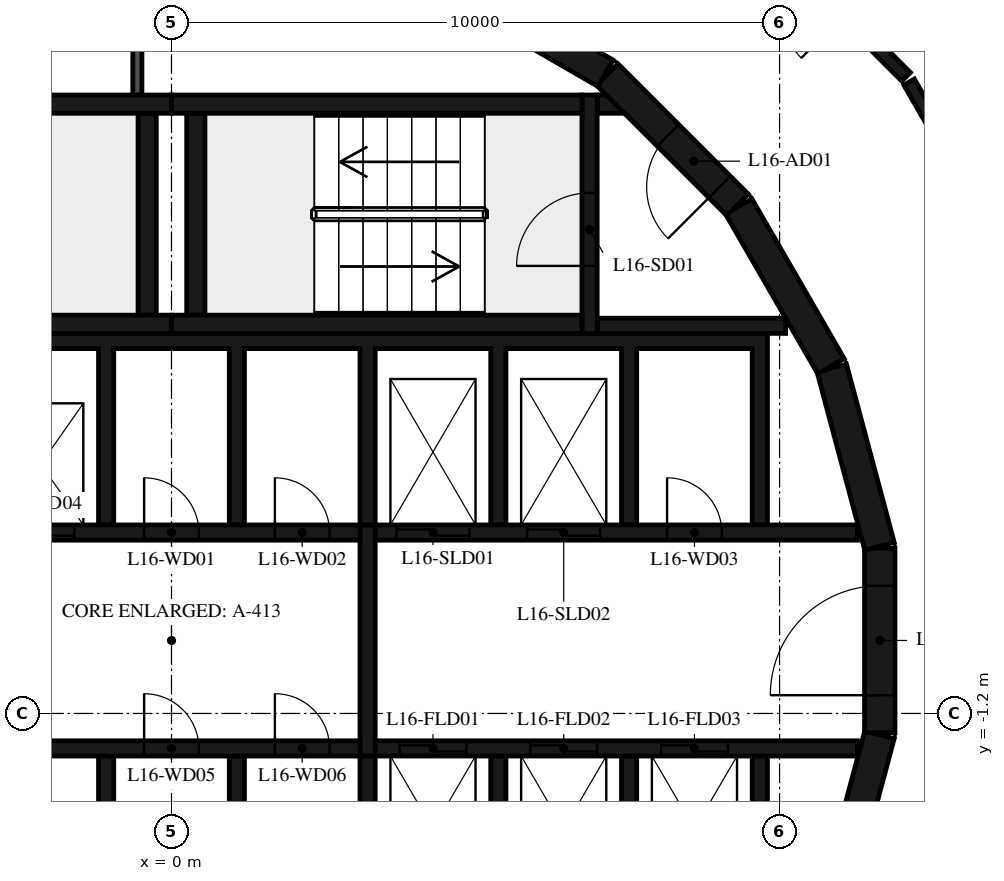
"""IFC4 building model, lengths in metres.
Left out: names, types, materials, properties, quantities, classifications, styles, units other than length and angle.
Written with IfcOpenShell. Run it as: python <this file> out.ifc"""

import sys

from ifc_helpers import new_model, si_unit, direction, frame, frame_2d, origin, place, context, subcontext, project, spatial, polyline, rectangle, outline, extrude, element, fill, save


model = new_model("IFC4")
c1 = context("Model", 3, precision=1e-05, world=origin(), true_north=direction((0.0, 1.0)))
c2 = subcontext(c1, "Body", "Model", "MODEL_VIEW")
j1 = project(units=[si_unit("LENGTHUNIT", "METRE"), si_unit("PLANEANGLEUNIT", "RADIAN")], contexts=[c1])
p1 = place(None, origin())
s1 = spatial("IfcSite", under=j1, at=p1, CompositionType="ELEMENT")
p2 = place(p1, origin())
s2 = spatial("IfcBuilding", under=s1, at=p2, CompositionType="ELEMENT")
p3 = place(p2, frame((0.0, 0.0, 69.9)))
s3 = spatial("IfcBuildingStorey", under=s2, at=p3, CompositionType="ELEMENT", Elevation=69.9)
p4 = place(p3, frame((10.858, -4.479, 0.0), z_axis=(0.0, 0.0, 1.0), x_axis=(0.258734743916, 0.965948410781, 0.0)))
e1 = element("IfcWall", 1, at=p4, inside=s3, PredefinedType="SHEAR", context=c2, shape_type="SweptSolid", body=[
    extrude(rectangle(XDim=3.033, YDim=0.5, at=frame_2d((1.516, 0.0))), origin(), (0.0, 0.0, 1.0), 6.35),
])
p5 = place(p3, frame((11.647, -1.516, 0.0), z_axis=(0.0, 0.0, 1.0), x_axis=(0.0, 1.0, 0.0)))
e2 = element("IfcWall", 2, at=p5, inside=s3, PredefinedType="SHEAR", context=c2, shape_type="SweptSolid", body=[
    extrude(rectangle(XDim=3.033, YDim=0.5, at=frame_2d((1.516, 0.0))), origin(), (0.0, 0.0, 1.0), 6.35),
])
p6 = place(p5, frame((0.616, 0.0, 0.0)))
e3 = element("IfcOpeningElement", 3, at=p6, cuts=e2, PredefinedType="OPENING", context=c2, shape_type="SweptSolid", body=[
    extrude(rectangle(XDim=1.8, YDim=2.1, at=frame_2d((0.9, 1.05))), frame((0.0, 0.26, 0.0), z_axis=(0.0, -1.0, 0.0), x_axis=(1.0, 0.0, 0.0)), (0.0, 0.0, 1.0), 0.52),
])
for number, where, z_axis, x_axis in (
    (4, (11.643, 1.55, 0.0), (0.0, 0.0, 1.0), (-0.259, 0.966, 0.0)),
    (5, (10.845, 4.51, 0.0), (0.0, 0.0, 1.0), (-0.5, 0.866, 0.0)),
):
    element("IfcWall", number, at=place(p3, frame(where, z_axis=z_axis, x_axis=x_axis)), inside=s3, PredefinedType="SHEAR", context=c2, shape_type="SweptSolid", body=[
        extrude(rectangle(XDim=3.033, YDim=0.5, at=frame_2d((1.516, 0.0))), origin(), (0.0, 0.0, 1.0), 6.35),
    ])
p7 = place(p3, frame((9.308, 7.164, 0.0), z_axis=(0.0, 0.0, 1.0), x_axis=(-0.707106781187, 0.707106781187, 0.0)))
e6 = element("IfcWall", 6, at=p7, inside=s3, PredefinedType="SHEAR", context=c2, shape_type="SweptSolid", body=[
    extrude(rectangle(XDim=3.032, YDim=0.5, at=frame_2d((1.516, 0.0))), origin(), (0.0, 0.0, 1.0), 6.35),
])
p8 = place(p7, frame((0.416, 0.0, 0.0)))
e7 = element("IfcOpeningElement", 7, at=p8, cuts=e6, PredefinedType="OPENING", context=c2, shape_type="SweptSolid", body=[
    extrude(rectangle(XDim=1.2, YDim=2.1, at=frame_2d((0.6, 1.05))), frame((0.0, 0.26, 0.0), z_axis=(0.0, -1.0, 0.0), x_axis=(1.0, 0.0, 0.0)), (0.0, 0.0, 1.0), 0.52),
])
p9 = place(p3, frame((7.137, 9.329, 0.0), z_axis=(0.0, 0.0, 1.0), x_axis=(-0.865975092491, 0.500087131594, 0.0)))
e8 = element("IfcWall", 8, at=p9, inside=s3, PredefinedType="SHEAR", context=c2, shape_type="SweptSolid", body=[
    extrude(rectangle(XDim=3.033, YDim=0.5, at=frame_2d((1.516, 0.0))), origin(), (0.0, 0.0, 1.0), 6.35),
])
for number, where, z_axis, x_axis in (
    (9, (0.0, 5.2, 0.0), (0.0, 0.0, 1.0), (1.0, 0.0, 0.0)),
    (10, (0.0, 8.82, 0.0), (0.0, 0.0, 1.0), (1.0, 0.0, 0.0)),
):
    element("IfcWall", number, at=place(p3, frame(where, z_axis=z_axis, x_axis=x_axis)), inside=s3, PredefinedType="SHEAR", context=c2, shape_type="SweptSolid", body=[
        extrude(rectangle(XDim=6.75, YDim=0.3, at=frame_2d((3.375, 0.0))), origin(), (0.0, 0.0, 1.0), 6.35),
    ])
p10 = place(p3, frame((0.4, 5.35, 0.0), z_axis=(0.0, 0.0, 1.0), x_axis=(0.0, 1.0, 0.0)))
e11 = element("IfcWall", 11, at=p10, inside=s3, PredefinedType="SHEAR", context=c2, shape_type="SweptSolid", body=[
    extrude(rectangle(XDim=3.32, YDim=0.3, at=frame_2d((1.66, 0.0))), origin(), (0.0, 0.0, 1.0), 6.35),
])
p11 = place(p3, frame((6.875, 5.05, 0.0), z_axis=(0.0, 0.0, 1.0), x_axis=(0.0, 1.0, 0.0)))
e12 = element("IfcWall", 12, at=p11, inside=s3, PredefinedType="SHEAR", context=c2, shape_type="SweptSolid", body=[
    extrude(rectangle(XDim=3.92, YDim=0.25, at=frame_2d((1.96, 0.0))), origin(), (0.0, 0.0, 1.0), 6.35),
])
p12 = place(p11, frame((1.11, 0.0, 0.0)))
e13 = element("IfcOpeningElement", 13, at=p12, cuts=e12, PredefinedType="OPENING", context=c2, shape_type="SweptSolid", body=[
    extrude(rectangle(XDim=1.2, YDim=2.1, at=frame_2d((0.6, 1.05))), frame((0.0, 0.135, 0.0), z_axis=(0.0, -1.0, 0.0), x_axis=(1.0, 0.0, 0.0)), (0.0, 0.0, 1.0), 0.27),
])
p13 = place(p3, frame((7.0, 5.175, 0.0), z_axis=(0.0, 0.0, 1.0), x_axis=(1.0, 0.0, 0.0)))
e14 = element("IfcWall", 14, at=p13, inside=s3, PredefinedType="SHEAR", context=c2, shape_type="SweptSolid", body=[
    extrude(rectangle(XDim=3.1, YDim=0.25, at=frame_2d((1.55, 0.0))), origin(), (0.0, 0.0, 1.0), 6.35),
])
p14 = place(p3, origin())
e15 = element("IfcWall", 15, at=p14, inside=s3, PredefinedType="SHEAR", context=c2, shape_type="SweptSolid", body=[
    extrude(outline(polyline([(7.448, 8.67), (7.0, 8.67), (7.0, 8.97), (7.148, 8.97), (7.448, 8.67)])), origin(), (0.0, 0.0, 1.0), 6.35),
])
for number, where, z_axis, x_axis in (
    (16, (-6.75, 5.2, 0.0), (0.0, 0.0, 1.0), (1.0, 0.0, 0.0)),
    (17, (-6.75, 8.82, 0.0), (0.0, 0.0, 1.0), (1.0, 0.0, 0.0)),
):
    element("IfcWall", number, at=place(p3, frame(where, z_axis=z_axis, x_axis=x_axis)), inside=s3, PredefinedType="SHEAR", context=c2, shape_type="SweptSolid", body=[
        extrude(rectangle(XDim=6.75, YDim=0.3, at=frame_2d((3.375, 0.0))), origin(), (0.0, 0.0, 1.0), 6.35),
    ])
p15 = place(p3, frame((-0.4, 5.35, 0.0), z_axis=(0.0, 0.0, 1.0), x_axis=(0.0, 1.0, 0.0)))
e18 = element("IfcWall", 18, at=p15, inside=s3, PredefinedType="SHEAR", context=c2, shape_type="SweptSolid", body=[
    extrude(rectangle(XDim=3.32, YDim=0.3, at=frame_2d((1.66, 0.0))), origin(), (0.0, 0.0, 1.0), 6.35),
])
p16 = place(p3, origin())
e19 = element("IfcWall", 19, at=p16, inside=s3, PredefinedType="SHEAR", context=c2, shape_type="SweptSolid", body=[
    extrude(outline(polyline([(-9.55, 4.8), (-7.65, 4.8), (-7.65, 1.9), (-7.4, 1.9), (-7.4, 4.8), (-5.5, 4.8), (-5.5, 1.9), (-5.25, 1.9), (-5.25, 4.8), (-3.35, 4.8), (-3.35, 1.9), (-3.1, 1.9), (-3.1, 4.8), (-1.2, 4.8), (-1.2, 1.9), (-0.95, 1.9), (-0.95, 4.8), (0.95, 4.8), (0.95, 1.9), (1.2, 1.9), (1.2, 4.8), (3.1, 4.8), (3.1, 1.9), (3.35, 1.9), (3.35, 4.8), (5.25, 4.8), (5.25, 1.9), (5.5, 1.9), (5.5, 4.8), (7.4, 4.8), (7.4, 1.9), (7.65, 1.9), (7.65, 4.8), (9.55, 4.8), (9.55, 1.9), (9.8, 1.9), (9.8, 4.8), (9.8, 5.05), (-9.8, 5.05), (-9.8, 4.8), (-9.8, 1.9), (-9.55, 1.9), (-9.55, 4.8)])), origin(), (0.0, 0.0, 1.0), 6.35),
])
p17 = place(p3, origin())
e20 = element("IfcWall", 20, at=p17, inside=s3, PredefinedType="SHEAR", context=c2, shape_type="SweptSolid", body=[
    extrude(outline(polyline([(9.8, -5.05), (9.8, -4.8), (9.8, -1.9), (9.55, -1.9), (9.55, -4.8), (7.65, -4.8), (7.65, -1.9), (7.4, -1.9), (7.4, -4.8), (5.5, -4.8), (5.5, -1.9), (5.25, -1.9), (5.25, -4.8), (3.35, -4.8), (3.35, -1.9), (3.1, -1.9), (3.1, -4.8), (1.2, -4.8), (1.2, -1.9), (0.95, -1.9), (0.95, -4.8), (-0.95, -4.8), (-0.95, -1.9), (-1.2, -1.9), (-1.2, -4.8), (-5.25, -4.8), (-5.25, -1.9), (-5.5, -1.9), (-5.5, -4.8), (-7.4, -4.8), (-7.4, -1.9), (-7.65, -1.9), (-7.65, -4.8), (-9.55, -4.8), (-9.55, -1.9), (-9.8, -1.9), (-9.8, -4.8), (-9.8, -5.05), (9.8, -5.05)])), origin(), (0.0, 0.0, 1.0), 6.35),
])
p18 = place(p3, frame((-11.28, 1.775, 0.0), z_axis=(0.0, 0.0, 1.0), x_axis=(1.0, 0.0, 0.0)))
e21 = element("IfcWall", 21, at=p18, inside=s3, PredefinedType="SHEAR", context=c2, shape_type="SweptSolid", body=[
    extrude(rectangle(XDim=14.38, YDim=0.25, at=frame_2d((7.19, 0.0))), origin(), (0.0, 0.0, 1.0), 6.35),
])
p19 = place(p18, frame((2.13, 0.0, 0.0)))
e22 = element("IfcOpeningElement", 22, at=p19, cuts=e21, PredefinedType="OPENING", context=c2, shape_type="SweptSolid", body=[
    extrude(rectangle(XDim=1.1, YDim=2.1, at=frame_2d((0.55, 1.05))), frame((0.0, 0.135, 0.0), z_axis=(0.0, -1.0, 0.0), x_axis=(1.0, 0.0, 0.0)), (0.0, 0.0, 1.0), 0.27),
])
p20 = place(p18, frame((4.28, 0.0, 0.0)))
e23 = element("IfcOpeningElement", 23, at=p20, cuts=e21, PredefinedType="OPENING", context=c2, shape_type="SweptSolid", body=[
    extrude(rectangle(XDim=1.1, YDim=2.1, at=frame_2d((0.55, 1.05))), frame((0.0, 0.135, 0.0), z_axis=(0.0, -1.0, 0.0), x_axis=(1.0, 0.0, 0.0)), (0.0, 0.0, 1.0), 0.27),
])
p21 = place(p18, frame((6.43, 0.0, 0.0)))
e24 = element("IfcOpeningElement", 24, at=p21, cuts=e21, PredefinedType="OPENING", context=c2, shape_type="SweptSolid", body=[
    extrude(rectangle(XDim=1.1, YDim=2.1, at=frame_2d((0.55, 1.05))), frame((0.0, 0.135, 0.0), z_axis=(0.0, -1.0, 0.0), x_axis=(1.0, 0.0, 0.0)), (0.0, 0.0, 1.0), 0.27),
])
p22 = place(p18, frame((8.58, 0.0, 0.0)))
e25 = element("IfcOpeningElement", 25, at=p22, cuts=e21, PredefinedType="OPENING", context=c2, shape_type="SweptSolid", body=[
    extrude(rectangle(XDim=1.1, YDim=2.1, at=frame_2d((0.55, 1.05))), frame((0.0, 0.135, 0.0), z_axis=(0.0, -1.0, 0.0), x_axis=(1.0, 0.0, 0.0)), (0.0, 0.0, 1.0), 0.27),
])
p23 = place(p18, frame((10.83, 0.0, 0.0)))
e26 = element("IfcOpeningElement", 26, at=p23, cuts=e21, PredefinedType="OPENING", context=c2, shape_type="SweptSolid", body=[
    extrude(rectangle(XDim=0.9, YDim=2.1, at=frame_2d((0.45, 1.05))), frame((0.0, 0.135, 0.0), z_axis=(0.0, -1.0, 0.0), x_axis=(1.0, 0.0, 0.0)), (0.0, 0.0, 1.0), 0.27),
])
p24 = place(p18, frame((12.98, 0.0, 0.0)))
e27 = element("IfcOpeningElement", 27, at=p24, cuts=e21, PredefinedType="OPENING", context=c2, shape_type="SweptSolid", body=[
    extrude(rectangle(XDim=0.9, YDim=2.1, at=frame_2d((0.45, 1.05))), frame((0.0, 0.135, 0.0), z_axis=(0.0, -1.0, 0.0), x_axis=(1.0, 0.0, 0.0)), (0.0, 0.0, 1.0), 0.27),
])
p25 = place(p3, frame((3.35, 1.775, 0.0), z_axis=(0.0, 0.0, 1.0), x_axis=(1.0, 0.0, 0.0)))
e28 = element("IfcWall", 28, at=p25, inside=s3, PredefinedType="SHEAR", context=c2, shape_type="SweptSolid", body=[
    extrude(rectangle(XDim=7.93, YDim=0.25, at=frame_2d((3.965, 0.0))), origin(), (0.0, 0.0, 1.0), 6.35),
])
p26 = place(p25, frame((0.35, 0.0, 0.0)))
e29 = element("IfcOpeningElement", 29, at=p26, cuts=e28, PredefinedType="OPENING", context=c2, shape_type="SweptSolid", body=[
    extrude(rectangle(XDim=1.2, YDim=2.4, at=frame_2d((0.6, 1.2))), frame((0.0, 0.135, 0.0), z_axis=(0.0, -1.0, 0.0), x_axis=(1.0, 0.0, 0.0)), (0.0, 0.0, 1.0), 0.27),
])
p27 = place(p25, frame((2.5, 0.0, 0.0)))
e30 = element("IfcOpeningElement", 30, at=p27, cuts=e28, PredefinedType="OPENING", context=c2, shape_type="SweptSolid", body=[
    extrude(rectangle(XDim=1.2, YDim=2.4, at=frame_2d((0.6, 1.2))), frame((0.0, 0.135, 0.0), z_axis=(0.0, -1.0, 0.0), x_axis=(1.0, 0.0, 0.0)), (0.0, 0.0, 1.0), 0.27),
])
p28 = place(p25, frame((4.8, 0.0, 0.0)))
e31 = element("IfcOpeningElement", 31, at=p28, cuts=e28, PredefinedType="OPENING", context=c2, shape_type="SweptSolid", body=[
    extrude(rectangle(XDim=0.9, YDim=2.1, at=frame_2d((0.45, 1.05))), frame((0.0, 0.135, 0.0), z_axis=(0.0, -1.0, 0.0), x_axis=(1.0, 0.0, 0.0)), (0.0, 0.0, 1.0), 0.27),
])
p29 = place(p3, frame((-11.28, -1.775, 0.0), z_axis=(0.0, 0.0, 1.0), x_axis=(1.0, 0.0, 0.0)))
e32 = element("IfcWall", 32, at=p29, inside=s3, PredefinedType="SHEAR", context=c2, shape_type="SweptSolid", body=[
    extrude(rectangle(XDim=14.38, YDim=0.25, at=frame_2d((7.19, 0.0))), origin(), (0.0, 0.0, 1.0), 6.35),
])
p30 = place(p29, frame((7.605, 0.0, 0.0)))
e33 = element("IfcOpeningElement", 33, at=p30, cuts=e32, PredefinedType="OPENING", context=c2, shape_type="SweptSolid", body=[
    extrude(rectangle(XDim=0.9, YDim=2.1, at=frame_2d((0.45, 1.05))), frame((0.0, 0.135, 0.0), z_axis=(0.0, -1.0, 0.0), x_axis=(1.0, 0.0, 0.0)), (0.0, 0.0, 1.0), 0.27),
])
p31 = place(p29, frame((10.83, 0.0, 0.0)))
e34 = element("IfcOpeningElement", 34, at=p31, cuts=e32, PredefinedType="OPENING", context=c2, shape_type="SweptSolid", body=[
    extrude(rectangle(XDim=0.9, YDim=2.1, at=frame_2d((0.45, 1.05))), frame((0.0, 0.135, 0.0), z_axis=(0.0, -1.0, 0.0), x_axis=(1.0, 0.0, 0.0)), (0.0, 0.0, 1.0), 0.27),
])
p32 = place(p29, frame((12.98, 0.0, 0.0)))
e35 = element("IfcOpeningElement", 35, at=p32, cuts=e32, PredefinedType="OPENING", context=c2, shape_type="SweptSolid", body=[
    extrude(rectangle(XDim=0.9, YDim=2.1, at=frame_2d((0.45, 1.05))), frame((0.0, 0.135, 0.0), z_axis=(0.0, -1.0, 0.0), x_axis=(1.0, 0.0, 0.0)), (0.0, 0.0, 1.0), 0.27),
])
p33 = place(p3, frame((3.35, -1.775, 0.0), z_axis=(0.0, 0.0, 1.0), x_axis=(1.0, 0.0, 0.0)))
e36 = element("IfcWall", 36, at=p33, inside=s3, PredefinedType="SHEAR", context=c2, shape_type="SweptSolid", body=[
    extrude(rectangle(XDim=7.93, YDim=0.25, at=frame_2d((3.965, 0.0))), origin(), (0.0, 0.0, 1.0), 6.35),
])
p34 = place(p33, frame((0.4, 0.0, 0.0)))
e37 = element("IfcOpeningElement", 37, at=p34, cuts=e36, PredefinedType="OPENING", context=c2, shape_type="SweptSolid", body=[
    extrude(rectangle(XDim=1.1, YDim=2.4, at=frame_2d((0.55, 1.2))), frame((0.0, 0.135, 0.0), z_axis=(0.0, -1.0, 0.0), x_axis=(1.0, 0.0, 0.0)), (0.0, 0.0, 1.0), 0.27),
])
p35 = place(p33, frame((2.55, 0.0, 0.0)))
e38 = element("IfcOpeningElement", 38, at=p35, cuts=e36, PredefinedType="OPENING", context=c2, shape_type="SweptSolid", body=[
    extrude(rectangle(XDim=1.1, YDim=2.4, at=frame_2d((0.55, 1.2))), frame((0.0, 0.135, 0.0), z_axis=(0.0, -1.0, 0.0), x_axis=(1.0, 0.0, 0.0)), (0.0, 0.0, 1.0), 0.27),
])
p36 = place(p33, frame((4.7, 0.0, 0.0)))
e39 = element("IfcOpeningElement", 39, at=p36, cuts=e36, PredefinedType="OPENING", context=c2, shape_type="SweptSolid", body=[
    extrude(rectangle(XDim=1.1, YDim=2.4, at=frame_2d((0.55, 1.2))), frame((0.0, 0.135, 0.0), z_axis=(0.0, -1.0, 0.0), x_axis=(1.0, 0.0, 0.0)), (0.0, 0.0, 1.0), 0.27),
])
p37 = place(p3, frame((3.225, -1.9, 0.0), z_axis=(0.0, 0.0, 1.0), x_axis=(0.0, 1.0, 0.0)))
e40 = element("IfcWall", 40, at=p37, inside=s3, PredefinedType="SHEAR", context=c2, shape_type="SweptSolid", body=[
    extrude(rectangle(XDim=3.8, YDim=0.25, at=frame_2d((1.9, 0.0))), origin(), (0.0, 0.0, 1.0), 6.35),
])
p38 = place(p3, frame((-0.562, 8.97, 0.0), z_axis=(0.0, 0.0, 1.0), x_axis=(0.0, 1.0, 0.0)))
e41 = element("IfcWall", 41, at=p38, inside=s3, PredefinedType="PARTITIONING", context=c2, shape_type="SweptSolid", body=[
    extrude(rectangle(XDim=2.427, YDim=0.15, at=frame_2d((1.214, 0.0))), origin(), (0.0, 0.0, 1.0), 6.35),
])
p39 = place(p38, frame((0.764, 0.0, 0.0)))
e42 = element("IfcOpeningElement", 42, at=p39, cuts=e41, PredefinedType="OPENING", context=c2, shape_type="SweptSolid", body=[
    extrude(rectangle(XDim=0.9, YDim=2.1, at=frame_2d((0.45, 1.05))), frame((0.0, 0.085, 0.0), z_axis=(0.0, -1.0, 0.0), x_axis=(1.0, 0.0, 0.0)), (0.0, 0.0, 1.0), 0.17),
])
p40 = place(p3, frame((12.08, 9.27, 0.0), z_axis=(0.0, 0.0, 1.0), x_axis=(-0.707106781187, 0.707106781187, 0.0)))
e43 = element("IfcWall", 43, at=p40, inside=s3, PredefinedType="PARTITIONING", context=c2, shape_type="SweptSolid", body=[
    extrude(rectangle(XDim=3.874, YDim=0.2, at=frame_2d((1.937, 0.0))), origin(), (0.0, 0.0, 1.0), 6.35),
])
p41 = place(p40, frame((1.437, 0.0, 0.0)))
e44 = element("IfcOpeningElement", 44, at=p41, cuts=e43, PredefinedType="OPENING", context=c2, shape_type="SweptSolid", body=[
    extrude(rectangle(XDim=1.0, YDim=2.1, at=frame_2d((0.5, 1.05))), frame((0.0, 0.11, 0.0), z_axis=(0.0, -1.0, 0.0), x_axis=(1.0, 0.0, 0.0)), (0.0, 0.0, 1.0), 0.22),
])
p42 = place(p3, frame((13.34, 7.09, 0.0), z_axis=(0.0, 0.0, 1.0), x_axis=(-0.500439091614, 0.865771745661, 0.0)))
e45 = element("IfcWall", 45, at=p42, inside=s3, PredefinedType="PARTITIONING", context=c2, shape_type="SweptSolid", body=[
    extrude(rectangle(XDim=2.418, YDim=0.2, at=frame_2d((1.209, 0.0))), origin(), (0.0, 0.0, 1.0), 6.35),
])
p43 = place(p12, origin())
e46 = element("IfcDoor", 46, at=p43, inside=s3, OperationType="SINGLE_SWING_LEFT", PredefinedType="DOOR", context=c2, shape_type="SweptSolid", body=[
    extrude(rectangle(XDim=1.2, YDim=2.1, at=frame_2d((0.6, 1.05))), frame((0.0, 0.025, 0.0), z_axis=(0.0, -1.0, 0.0), x_axis=(1.0, 0.0, 0.0)), (0.0, 0.0, 1.0), 0.05),
])
fill(e13, e46)
p44 = place(p8, origin())
e47 = element("IfcDoor", 47, at=p44, inside=s3, OperationType="SINGLE_SWING_RIGHT", PredefinedType="DOOR", context=c2, shape_type="SweptSolid", body=[
    extrude(rectangle(XDim=1.2, YDim=2.1, at=frame_2d((0.6, 1.05))), frame((0.0, 0.025, 0.0), z_axis=(0.0, -1.0, 0.0), x_axis=(1.0, 0.0, 0.0)), (0.0, 0.0, 1.0), 0.05),
])
fill(e7, e47)
p45 = place(p6, origin())
e48 = element("IfcDoor", 48, at=p45, inside=s3, OperationType="DOUBLE_DOOR_SINGLE_SWING", PredefinedType="DOOR", context=c2, shape_type="SweptSolid", body=[
    extrude(rectangle(XDim=1.8, YDim=2.1, at=frame_2d((0.9, 1.05))), frame((0.0, 0.025, 0.0), z_axis=(0.0, -1.0, 0.0), x_axis=(1.0, 0.0, 0.0)), (0.0, 0.0, 1.0), 0.05),
])
fill(e3, e48)
p46 = place(p22, origin())
e49 = element("IfcDoor", 49, at=p46, inside=s3, OperationType="DOUBLE_DOOR_SLIDING", PredefinedType="DOOR", context=c2, shape_type="SweptSolid", body=[
    extrude(rectangle(XDim=1.1, YDim=2.1, at=frame_2d((0.55, 1.05))), frame((0.0, 0.025, 0.0), z_axis=(0.0, -1.0, 0.0), x_axis=(1.0, 0.0, 0.0)), (0.0, 0.0, 1.0), 0.05),
])
fill(e25, e49)
p47 = place(p26, origin())
e50 = element("IfcDoor", 50, at=p47, inside=s3, OperationType="DOUBLE_DOOR_SLIDING", PredefinedType="DOOR", context=c2, shape_type="SweptSolid", body=[
    extrude(rectangle(XDim=1.2, YDim=2.4, at=frame_2d((0.6, 1.2))), frame((0.0, 0.025, 0.0), z_axis=(0.0, -1.0, 0.0), x_axis=(1.0, 0.0, 0.0)), (0.0, 0.0, 1.0), 0.05),
])
fill(e29, e50)
p48 = place(p27, origin())
e51 = element("IfcDoor", 51, at=p48, inside=s3, OperationType="DOUBLE_DOOR_SLIDING", PredefinedType="DOOR", context=c2, shape_type="SweptSolid", body=[
    extrude(rectangle(XDim=1.2, YDim=2.4, at=frame_2d((0.6, 1.2))), frame((0.0, 0.025, 0.0), z_axis=(0.0, -1.0, 0.0), x_axis=(1.0, 0.0, 0.0)), (0.0, 0.0, 1.0), 0.05),
])
fill(e30, e51)
p49 = place(p34, origin())
e52 = element("IfcDoor", 52, at=p49, inside=s3, OperationType="DOUBLE_DOOR_SLIDING", PredefinedType="DOOR", context=c2, shape_type="SweptSolid", body=[
    extrude(rectangle(XDim=1.1, YDim=2.4, at=frame_2d((0.55, 1.2))), frame((0.0, 0.025, 0.0), z_axis=(0.0, -1.0, 0.0), x_axis=(1.0, 0.0, 0.0)), (0.0, 0.0, 1.0), 0.05),
])
fill(e37, e52)
p50 = place(p35, origin())
e53 = element("IfcDoor", 53, at=p50, inside=s3, OperationType="DOUBLE_DOOR_SLIDING", PredefinedType="DOOR", context=c2, shape_type="SweptSolid", body=[
    extrude(rectangle(XDim=1.1, YDim=2.4, at=frame_2d((0.55, 1.2))), frame((0.0, 0.025, 0.0), z_axis=(0.0, -1.0, 0.0), x_axis=(1.0, 0.0, 0.0)), (0.0, 0.0, 1.0), 0.05),
])
fill(e38, e53)
p51 = place(p36, origin())
e54 = element("IfcDoor", 54, at=p51, inside=s3, OperationType="DOUBLE_DOOR_SLIDING", PredefinedType="DOOR", context=c2, shape_type="SweptSolid", body=[
    extrude(rectangle(XDim=1.1, YDim=2.4, at=frame_2d((0.55, 1.2))), frame((0.0, 0.025, 0.0), z_axis=(0.0, -1.0, 0.0), x_axis=(1.0, 0.0, 0.0)), (0.0, 0.0, 1.0), 0.05),
])
fill(e39, e54)
p52 = place(p23, origin())
e55 = element("IfcDoor", 55, at=p52, inside=s3, OperationType="SINGLE_SWING_RIGHT", PredefinedType="DOOR", context=c2, shape_type="SweptSolid", body=[
    extrude(rectangle(XDim=0.9, YDim=2.1, at=frame_2d((0.45, 1.05))), frame((0.0, 0.025, 0.0), z_axis=(0.0, -1.0, 0.0), x_axis=(1.0, 0.0, 0.0)), (0.0, 0.0, 1.0), 0.05),
])
fill(e26, e55)
p53 = place(p24, origin())
e56 = element("IfcDoor", 56, at=p53, inside=s3, OperationType="SINGLE_SWING_LEFT", PredefinedType="DOOR", context=c2, shape_type="SweptSolid", body=[
    extrude(rectangle(XDim=0.9, YDim=2.1, at=frame_2d((0.45, 1.05))), frame((0.0, 0.025, 0.0), z_axis=(0.0, -1.0, 0.0), x_axis=(1.0, 0.0, 0.0)), (0.0, 0.0, 1.0), 0.05),
])
fill(e27, e56)
p54 = place(p28, origin())
e57 = element("IfcDoor", 57, at=p54, inside=s3, OperationType="SINGLE_SWING_RIGHT", PredefinedType="DOOR", context=c2, shape_type="SweptSolid", body=[
    extrude(rectangle(XDim=0.9, YDim=2.1, at=frame_2d((0.45, 1.05))), frame((0.0, 0.025, 0.0), z_axis=(0.0, -1.0, 0.0), x_axis=(1.0, 0.0, 0.0)), (0.0, 0.0, 1.0), 0.05),
])
fill(e31, e57)
p55 = place(p31, origin())
e58 = element("IfcDoor", 58, at=p55, inside=s3, OperationType="SINGLE_SWING_RIGHT", PredefinedType="DOOR", context=c2, shape_type="SweptSolid", body=[
    extrude(rectangle(XDim=0.9, YDim=2.1, at=frame_2d((0.45, 1.05))), frame((0.0, 0.025, 0.0), z_axis=(0.0, -1.0, 0.0), x_axis=(1.0, 0.0, 0.0)), (0.0, 0.0, 1.0), 0.05),
])
fill(e34, e58)
p56 = place(p32, origin())
e59 = element("IfcDoor", 59, at=p56, inside=s3, OperationType="SINGLE_SWING_LEFT", PredefinedType="DOOR", context=c2, shape_type="SweptSolid", body=[
    extrude(rectangle(XDim=0.9, YDim=2.1, at=frame_2d((0.45, 1.05))), frame((0.0, 0.025, 0.0), z_axis=(0.0, -1.0, 0.0), x_axis=(1.0, 0.0, 0.0)), (0.0, 0.0, 1.0), 0.05),
])
fill(e35, e59)
save(model, sys.argv[1])
